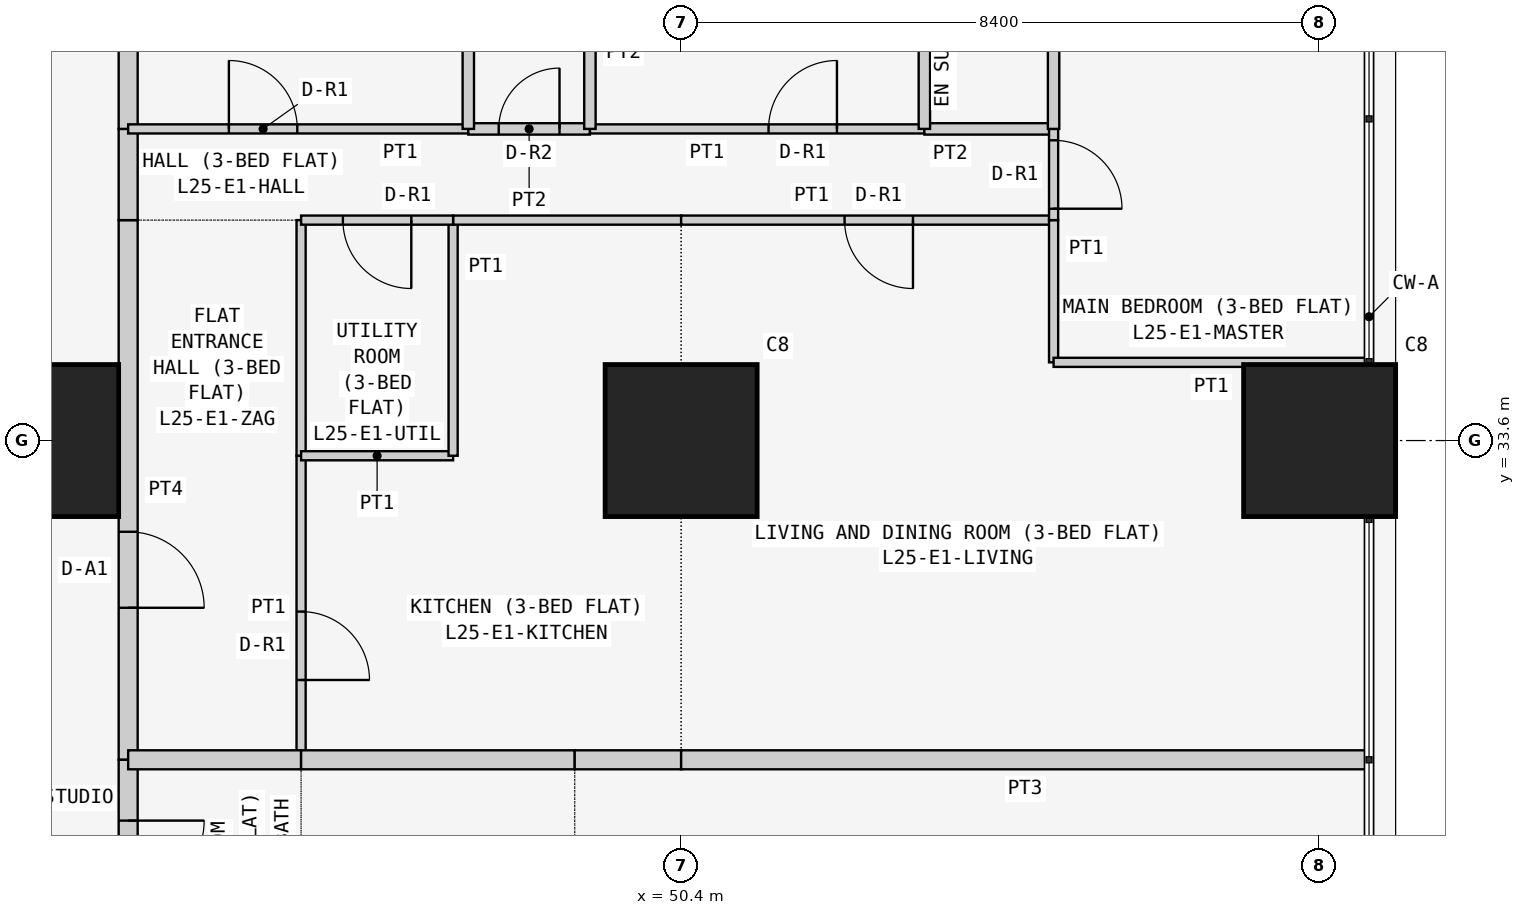
"""IFC4 building model, lengths in metres.
Left out: names, types, materials, properties, quantities, classifications, styles, units other than length and angle.
Written with IfcOpenShell. Run it as: python <this file> out.ifc"""

import sys

from ifc_helpers import new_model, si_unit, direction, frame, frame_2d, origin, origin_2d, place, context, subcontext, project, spatial, rectangle, extrude, element, fill, save


model = new_model("IFC4")
c1 = context("Model", 3, precision=1e-05, world=origin(), true_north=direction((0.0, 1.0)))
c2 = subcontext(c1, "Body", "Model", "MODEL_VIEW")
j1 = project(units=[si_unit("LENGTHUNIT", "METRE"), si_unit("PLANEANGLEUNIT", "RADIAN")], contexts=[c1])
p1 = place(None, origin())
s1 = spatial("IfcSite", under=j1, at=p1, CompositionType="ELEMENT")
p2 = place(p1, origin())
s2 = spatial("IfcBuilding", under=s1, at=p2, CompositionType="ELEMENT")
p3 = place(p2, frame((0.0, 0.0, 99.3)))
s3 = spatial("IfcBuildingStorey", under=s2, at=p3, CompositionType="ELEMENT", Elevation=99.3)
for number, where, z_axis, x_axis in (
    (1, (42.0, 33.6, 0.0), (0.0, 0.0, 1.0), (1.0, 0.0, 0.0)),
    (2, (50.4, 33.6, 0.0), (0.0, 0.0, 1.0), (1.0, 0.0, 0.0)),
    (3, (58.8, 33.6, 0.0), (0.0, 0.0, 1.0), (1.0, 0.0, 0.0)),
):
    element("IfcColumn", number, at=place(p3, frame(where, z_axis=z_axis, x_axis=x_axis)), inside=s3, PredefinedType="COLUMN", context=c2, shape_type="SweptSolid", body=[
        extrude(rectangle(XDim=2.0, YDim=2.0, at=origin_2d()), origin(), (0.0, 0.0, 1.0), 3.6),
    ])
p4 = place(p3, frame((43.125, 36.5, 0.0), z_axis=(0.0, 0.0, 1.0), x_axis=(0.0, -1.0, 0.0)))
e4 = element("IfcWall", 4, at=p4, inside=s3, PredefinedType="PARTITIONING", context=c2, shape_type="SweptSolid", body=[
    extrude(rectangle(XDim=7.1, YDim=0.25, at=frame_2d((3.55, 0.0))), origin(), (0.0, 0.0, 1.0), 3.35),
])
p5 = place(p4, frame((4.1, 0.0, 0.0)))
e5 = element("IfcOpeningElement", 5, at=p5, cuts=e4, PredefinedType="OPENING", context=c2, shape_type="SweptSolid", body=[
    extrude(rectangle(XDim=1.0, YDim=2.1, at=frame_2d((0.5, 1.05))), frame((0.0, 0.135, 0.0), z_axis=(0.0, -1.0, 0.0), x_axis=(1.0, 0.0, 0.0)), (0.0, 0.0, 1.0), 0.27),
])
p6 = place(p3, frame((43.125, 37.7, 0.0), z_axis=(0.0, 0.0, 1.0), x_axis=(0.0, -1.0, 0.0)))
e6 = element("IfcWall", 6, at=p6, inside=s3, PredefinedType="PARTITIONING", context=c2, shape_type="SweptSolid", body=[
    extrude(rectangle(XDim=1.2, YDim=0.25, at=frame_2d((0.6, 0.0))), origin(), (0.0, 0.0, 1.0), 3.35),
])
p7 = place(p3, frame((43.125, 42.7, 0.0), z_axis=(0.0, 0.0, 1.0), x_axis=(0.0, -1.0, 0.0)))
e7 = element("IfcWall", 7, at=p7, inside=s3, PredefinedType="PARTITIONING", context=c2, shape_type="SweptSolid", body=[
    extrude(rectangle(XDim=5.0, YDim=0.25, at=frame_2d((2.5, 0.0))), origin(), (0.0, 0.0, 1.0), 3.35),
])
p8 = place(p3, frame((43.125, 29.4, 0.0), z_axis=(0.0, 0.0, 1.0), x_axis=(0.0, -1.0, 0.0)))
e8 = element("IfcWall", 8, at=p8, inside=s3, PredefinedType="PARTITIONING", context=c2, shape_type="SweptSolid", body=[
    extrude(rectangle(XDim=2.6, YDim=0.25, at=frame_2d((1.3, 0.0))), origin(), (0.0, 0.0, 1.0), 3.35),
])
p9 = place(p8, frame((0.8, 0.0, 0.0)))
e9 = element("IfcOpeningElement", 9, at=p9, cuts=e8, PredefinedType="OPENING", context=c2, shape_type="SweptSolid", body=[
    extrude(rectangle(XDim=1.0, YDim=2.1, at=frame_2d((0.5, 1.05))), frame((0.0, 0.135, 0.0), z_axis=(0.0, -1.0, 0.0), x_axis=(1.0, 0.0, 0.0)), (0.0, 0.0, 1.0), 0.27),
])
p10 = place(p3, frame((45.4, 29.4, 0.0), z_axis=(0.0, 0.0, 1.0), x_axis=(0.0, 1.0, 0.0)))
e10 = element("IfcWall", 10, at=p10, inside=s3, PredefinedType="PARTITIONING", context=c2, shape_type="SweptSolid", body=[
    extrude(rectangle(XDim=4.0, YDim=0.12, at=frame_2d((2.0, 0.0))), origin(), (0.0, 0.0, 1.0), 3.35),
])
p11 = place(p10, frame((1.05, 0.0, 0.0)))
e11 = element("IfcOpeningElement", 11, at=p11, cuts=e10, PredefinedType="OPENING", context=c2, shape_type="SweptSolid", body=[
    extrude(rectangle(XDim=0.9, YDim=2.1, at=frame_2d((0.45, 1.05))), frame((0.0, 0.07, 0.0), z_axis=(0.0, -1.0, 0.0), x_axis=(1.0, 0.0, 0.0)), (0.0, 0.0, 1.0), 0.14),
])
p12 = place(p3, frame((45.4, 33.4, 0.0), z_axis=(0.0, 0.0, 1.0), x_axis=(0.0, 1.0, 0.0)))
e12 = element("IfcWall", 12, at=p12, inside=s3, PredefinedType="PARTITIONING", context=c2, shape_type="SweptSolid", body=[
    extrude(rectangle(XDim=3.1, YDim=0.12, at=frame_2d((1.55, 0.0))), origin(), (0.0, 0.0, 1.0), 3.35),
])
p13 = place(p3, frame((43.125, 29.4, 0.0), z_axis=(0.0, 0.0, 1.0), x_axis=(1.0, 0.0, 0.0)))
e13 = element("IfcWall", 13, at=p13, inside=s3, PredefinedType="PARTITIONING", context=c2, shape_type="SweptSolid", body=[
    extrude(rectangle(XDim=2.275, YDim=0.25, at=frame_2d((1.137, 0.0))), origin(), (0.0, 0.0, 1.0), 3.35),
])
p14 = place(p3, frame((45.4, 33.4, 0.0), z_axis=(0.0, 0.0, 1.0), x_axis=(1.0, 0.0, 0.0)))
e14 = element("IfcWall", 14, at=p14, inside=s3, PredefinedType="PARTITIONING", context=c2, shape_type="SweptSolid", body=[
    extrude(rectangle(XDim=2.0, YDim=0.12, at=frame_2d((1.0, 0.0))), origin(), (0.0, 0.0, 1.0), 3.35),
])
p15 = place(p3, frame((47.4, 33.4, 0.0), z_axis=(0.0, 0.0, 1.0), x_axis=(0.0, 1.0, 0.0)))
e15 = element("IfcWall", 15, at=p15, inside=s3, PredefinedType="PARTITIONING", context=c2, shape_type="SweptSolid", body=[
    extrude(rectangle(XDim=3.1, YDim=0.12, at=frame_2d((1.55, 0.0))), origin(), (0.0, 0.0, 1.0), 3.35),
])
p16 = place(p3, frame((47.4, 36.5, 0.0), z_axis=(0.0, 0.0, 1.0), x_axis=(1.0, 0.0, 0.0)))
e16 = element("IfcWall", 16, at=p16, inside=s3, PredefinedType="PARTITIONING", context=c2, shape_type="SweptSolid", body=[
    extrude(rectangle(XDim=3.0, YDim=0.12, at=frame_2d((1.5, 0.0))), origin(), (0.0, 0.0, 1.0), 3.35),
])
p17 = place(p3, frame((49.0, 29.4, 0.0), z_axis=(0.0, 0.0, 1.0), x_axis=(-1.0, 0.0, 0.0)))
e17 = element("IfcWall", 17, at=p17, inside=s3, PredefinedType="PARTITIONING", context=c2, shape_type="SweptSolid", body=[
    extrude(rectangle(XDim=3.6, YDim=0.25, at=frame_2d((1.8, 0.0))), origin(), (0.0, 0.0, 1.0), 3.35),
])
p18 = place(p3, frame((50.4, 29.4, 0.0), z_axis=(0.0, 0.0, 1.0), x_axis=(-1.0, 0.0, 0.0)))
e18 = element("IfcWall", 18, at=p18, inside=s3, PredefinedType="PARTITIONING", context=c2, shape_type="SweptSolid", body=[
    extrude(rectangle(XDim=1.4, YDim=0.25, at=frame_2d((0.7, 0.0))), origin(), (0.0, 0.0, 1.0), 3.35),
])
p19 = place(p3, frame((47.4, 36.5, 0.0), z_axis=(0.0, 0.0, 1.0), x_axis=(-1.0, 0.0, 0.0)))
e19 = element("IfcWall", 19, at=p19, inside=s3, PredefinedType="PARTITIONING", context=c2, shape_type="SweptSolid", body=[
    extrude(rectangle(XDim=2.0, YDim=0.12, at=frame_2d((1.0, 0.0))), origin(), (0.0, 0.0, 1.0), 3.35),
])
p20 = place(p19, frame((0.55, 0.0, 0.0)))
e20 = element("IfcOpeningElement", 20, at=p20, cuts=e19, PredefinedType="OPENING", context=c2, shape_type="SweptSolid", body=[
    extrude(rectangle(XDim=0.9, YDim=2.1, at=frame_2d((0.45, 1.05))), frame((0.0, 0.07, 0.0), z_axis=(0.0, -1.0, 0.0), x_axis=(1.0, 0.0, 0.0)), (0.0, 0.0, 1.0), 0.14),
])
p21 = place(p3, frame((50.4, 36.5, 0.0), z_axis=(0.0, 0.0, 1.0), x_axis=(1.0, 0.0, 0.0)))
e21 = element("IfcWall", 21, at=p21, inside=s3, PredefinedType="PARTITIONING", context=c2, shape_type="SweptSolid", body=[
    extrude(rectangle(XDim=4.9, YDim=0.12, at=frame_2d((2.45, 0.0))), origin(), (0.0, 0.0, 1.0), 3.35),
])
p22 = place(p21, frame((2.15, 0.0, 0.0)))
e22 = element("IfcOpeningElement", 22, at=p22, cuts=e21, PredefinedType="OPENING", context=c2, shape_type="SweptSolid", body=[
    extrude(rectangle(XDim=0.9, YDim=2.1, at=frame_2d((0.45, 1.05))), frame((0.0, 0.07, 0.0), z_axis=(0.0, -1.0, 0.0), x_axis=(1.0, 0.0, 0.0)), (0.0, 0.0, 1.0), 0.14),
])
p23 = place(p3, frame((55.3, 36.5, 0.0), z_axis=(0.0, 0.0, 1.0), x_axis=(0.0, -1.0, 0.0)))
e23 = element("IfcWall", 23, at=p23, inside=s3, PredefinedType="PARTITIONING", context=c2, shape_type="SweptSolid", body=[
    extrude(rectangle(XDim=1.871, YDim=0.12, at=frame_2d((0.936, 0.0))), origin(), (0.0, 0.0, 1.0), 3.35),
])
p24 = place(p3, frame((55.3, 34.629, 0.0), z_axis=(0.0, 0.0, 1.0), x_axis=(1.0, 0.0, 0.0)))
e24 = element("IfcWall", 24, at=p24, inside=s3, PredefinedType="PARTITIONING", context=c2, shape_type="SweptSolid", body=[
    extrude(rectangle(XDim=4.15, YDim=0.12, at=frame_2d((2.075, 0.0))), origin(), (0.0, 0.0, 1.0), 3.35),
])
p25 = place(p3, frame((59.45, 29.4, 0.0), z_axis=(0.0, 0.0, 1.0), x_axis=(-1.0, 0.0, 0.0)))
e25 = element("IfcWall", 25, at=p25, inside=s3, PredefinedType="PARTITIONING", context=c2, shape_type="SweptSolid", body=[
    extrude(rectangle(XDim=9.05, YDim=0.25, at=frame_2d((4.525, 0.0))), origin(), (0.0, 0.0, 1.0), 3.35),
])
p26 = place(p3, frame((47.6, 37.7, 0.0), z_axis=(0.0, 0.0, 1.0), x_axis=(-1.0, 0.0, 0.0)))
e26 = element("IfcWall", 26, at=p26, inside=s3, PredefinedType="PARTITIONING", context=c2, shape_type="SweptSolid", body=[
    extrude(rectangle(XDim=4.475, YDim=0.12, at=frame_2d((2.238, 0.0))), origin(), (0.0, 0.0, 1.0), 3.35),
])
p27 = place(p26, frame((2.25, 0.0, 0.0)))
e27 = element("IfcOpeningElement", 27, at=p27, cuts=e26, PredefinedType="OPENING", context=c2, shape_type="SweptSolid", body=[
    extrude(rectangle(XDim=0.9, YDim=2.1, at=frame_2d((0.45, 1.05))), frame((0.0, 0.07, 0.0), z_axis=(0.0, -1.0, 0.0), x_axis=(1.0, 0.0, 0.0)), (0.0, 0.0, 1.0), 0.14),
])
p28 = place(p3, frame((49.2, 37.7, 0.0), z_axis=(0.0, 0.0, 1.0), x_axis=(-1.0, 0.0, 0.0)))
e28 = element("IfcWall", 28, at=p28, inside=s3, PredefinedType="PARTITIONING", context=c2, shape_type="SweptSolid", body=[
    extrude(rectangle(XDim=1.6, YDim=0.15, at=frame_2d((0.8, 0.0))), origin(), (0.0, 0.0, 1.0), 3.35),
])
p29 = place(p28, frame((0.4, 0.0, 0.0)))
e29 = element("IfcOpeningElement", 29, at=p29, cuts=e28, PredefinedType="OPENING", context=c2, shape_type="SweptSolid", body=[
    extrude(rectangle(XDim=0.8, YDim=2.1, at=frame_2d((0.4, 1.05))), frame((0.0, 0.085, 0.0), z_axis=(0.0, -1.0, 0.0), x_axis=(1.0, 0.0, 0.0)), (0.0, 0.0, 1.0), 0.17),
])
p30 = place(p3, frame((53.6, 37.7, 0.0), z_axis=(0.0, 0.0, 1.0), x_axis=(-1.0, 0.0, 0.0)))
e30 = element("IfcWall", 30, at=p30, inside=s3, PredefinedType="PARTITIONING", context=c2, shape_type="SweptSolid", body=[
    extrude(rectangle(XDim=4.4, YDim=0.12, at=frame_2d((2.2, 0.0))), origin(), (0.0, 0.0, 1.0), 3.35),
])
p31 = place(p30, frame((1.15, 0.0, 0.0)))
e31 = element("IfcOpeningElement", 31, at=p31, cuts=e30, PredefinedType="OPENING", context=c2, shape_type="SweptSolid", body=[
    extrude(rectangle(XDim=0.9, YDim=2.1, at=frame_2d((0.45, 1.05))), frame((0.0, 0.07, 0.0), z_axis=(0.0, -1.0, 0.0), x_axis=(1.0, 0.0, 0.0)), (0.0, 0.0, 1.0), 0.14),
])
p32 = place(p3, frame((55.3, 37.7, 0.0), z_axis=(0.0, 0.0, 1.0), x_axis=(-1.0, 0.0, 0.0)))
e32 = element("IfcWall", 32, at=p32, inside=s3, PredefinedType="PARTITIONING", context=c2, shape_type="SweptSolid", body=[
    extrude(rectangle(XDim=1.7, YDim=0.15, at=frame_2d((0.85, 0.0))), origin(), (0.0, 0.0, 1.0), 3.35),
])
p33 = place(p3, frame((55.3, 36.5, 0.0), z_axis=(0.0, 0.0, 1.0), x_axis=(0.0, 1.0, 0.0)))
e33 = element("IfcWall", 33, at=p33, inside=s3, PredefinedType="PARTITIONING", context=c2, shape_type="SweptSolid", body=[
    extrude(rectangle(XDim=1.2, YDim=0.12, at=frame_2d((0.6, 0.0))), origin(), (0.0, 0.0, 1.0), 3.35),
])
p34 = place(p33, frame((0.15, 0.0, 0.0)))
e34 = element("IfcOpeningElement", 34, at=p34, cuts=e33, PredefinedType="OPENING", context=c2, shape_type="SweptSolid", body=[
    extrude(rectangle(XDim=0.9, YDim=2.1, at=frame_2d((0.45, 1.05))), frame((0.0, 0.07, 0.0), z_axis=(0.0, -1.0, 0.0), x_axis=(1.0, 0.0, 0.0)), (0.0, 0.0, 1.0), 0.14),
])
for number, where, z_axis, x_axis in (
    (35, (47.6, 37.7, 0.0), (0.0, 0.0, 1.0), (0.0, 1.0, 0.0)),
    (36, (49.2, 37.7, 0.0), (0.0, 0.0, 1.0), (0.0, 1.0, 0.0)),
    (37, (53.6, 37.7, 0.0), (0.0, 0.0, 1.0), (0.0, 1.0, 0.0)),
):
    element("IfcWall", number, at=place(p3, frame(where, z_axis=z_axis, x_axis=x_axis)), inside=s3, PredefinedType="PARTITIONING", context=c2, shape_type="SweptSolid", body=[
        extrude(rectangle(XDim=5.0, YDim=0.15, at=frame_2d((2.5, 0.0))), origin(), (0.0, 0.0, 1.0), 3.35),
    ])
p35 = place(p3, frame((55.3, 37.7, 0.0), z_axis=(0.0, 0.0, 1.0), x_axis=(0.0, 1.0, 0.0)))
e38 = element("IfcWall", 38, at=p35, inside=s3, PredefinedType="PARTITIONING", context=c2, shape_type="SweptSolid", body=[
    extrude(rectangle(XDim=5.0, YDim=0.15, at=frame_2d((2.5, 0.0))), origin(), (0.0, 0.0, 1.0), 3.35),
])
p36 = place(p35, frame((2.3, 0.0, 0.0)))
e39 = element("IfcOpeningElement", 39, at=p36, cuts=e38, PredefinedType="OPENING", context=c2, shape_type="SweptSolid", body=[
    extrude(rectangle(XDim=0.8, YDim=2.1, at=frame_2d((0.4, 1.05))), frame((0.0, 0.085, 0.0), z_axis=(0.0, -1.0, 0.0), x_axis=(1.0, 0.0, 0.0)), (0.0, 0.0, 1.0), 0.17),
])
p37 = place(p5, origin())
e40 = element("IfcDoor", 40, at=p37, inside=s3, OperationType="SINGLE_SWING_RIGHT", PredefinedType="DOOR", context=c2, shape_type="SweptSolid", body=[
    extrude(rectangle(XDim=1.0, YDim=2.1, at=frame_2d((0.5, 1.05))), frame((0.0, 0.025, 0.0), z_axis=(0.0, -1.0, 0.0), x_axis=(1.0, 0.0, 0.0)), (0.0, 0.0, 1.0), 0.05),
])
fill(e5, e40)
p38 = place(p11, frame((0.9, 0.0, 0.0), z_axis=(0.0, 0.0, 1.0), x_axis=(-1.0, 0.0, 0.0)))
e41 = element("IfcDoor", 41, at=p38, inside=s3, OperationType="SINGLE_SWING_RIGHT", PredefinedType="DOOR", context=c2, shape_type="SweptSolid", body=[
    extrude(rectangle(XDim=0.9, YDim=2.1, at=frame_2d((0.45, 1.05))), frame((0.0, 0.025, 0.0), z_axis=(0.0, -1.0, 0.0), x_axis=(1.0, 0.0, 0.0)), (0.0, 0.0, 1.0), 0.05),
])
fill(e11, e41)
p39 = place(p20, origin())
e42 = element("IfcDoor", 42, at=p39, inside=s3, OperationType="SINGLE_SWING_LEFT", PredefinedType="DOOR", context=c2, shape_type="SweptSolid", body=[
    extrude(rectangle(XDim=0.9, YDim=2.1, at=frame_2d((0.45, 1.05))), frame((0.0, 0.025, 0.0), z_axis=(0.0, -1.0, 0.0), x_axis=(1.0, 0.0, 0.0)), (0.0, 0.0, 1.0), 0.05),
])
fill(e20, e42)
p40 = place(p22, frame((0.9, 0.0, 0.0), z_axis=(0.0, 0.0, 1.0), x_axis=(-1.0, 0.0, 0.0)))
e43 = element("IfcDoor", 43, at=p40, inside=s3, OperationType="SINGLE_SWING_LEFT", PredefinedType="DOOR", context=c2, shape_type="SweptSolid", body=[
    extrude(rectangle(XDim=0.9, YDim=2.1, at=frame_2d((0.45, 1.05))), frame((0.0, 0.025, 0.0), z_axis=(0.0, -1.0, 0.0), x_axis=(1.0, 0.0, 0.0)), (0.0, 0.0, 1.0), 0.05),
])
fill(e22, e43)
p41 = place(p27, frame((0.9, 0.0, 0.0), z_axis=(0.0, 0.0, 1.0), x_axis=(-1.0, 0.0, 0.0)))
e44 = element("IfcDoor", 44, at=p41, inside=s3, OperationType="SINGLE_SWING_LEFT", PredefinedType="DOOR", context=c2, shape_type="SweptSolid", body=[
    extrude(rectangle(XDim=0.9, YDim=2.1, at=frame_2d((0.45, 1.05))), frame((0.0, 0.025, 0.0), z_axis=(0.0, -1.0, 0.0), x_axis=(1.0, 0.0, 0.0)), (0.0, 0.0, 1.0), 0.05),
])
fill(e27, e44)
p42 = place(p29, frame((0.8, 0.0, 0.0), z_axis=(0.0, 0.0, 1.0), x_axis=(-1.0, 0.0, 0.0)))
e45 = element("IfcDoor", 45, at=p42, inside=s3, OperationType="SINGLE_SWING_RIGHT", PredefinedType="DOOR", context=c2, shape_type="SweptSolid", body=[
    extrude(rectangle(XDim=0.8, YDim=2.1, at=frame_2d((0.4, 1.05))), frame((0.0, 0.025, 0.0), z_axis=(0.0, -1.0, 0.0), x_axis=(1.0, 0.0, 0.0)), (0.0, 0.0, 1.0), 0.05),
])
fill(e29, e45)
p43 = place(p31, frame((0.9, 0.0, 0.0), z_axis=(0.0, 0.0, 1.0), x_axis=(-1.0, 0.0, 0.0)))
e46 = element("IfcDoor", 46, at=p43, inside=s3, OperationType="SINGLE_SWING_RIGHT", PredefinedType="DOOR", context=c2, shape_type="SweptSolid", body=[
    extrude(rectangle(XDim=0.9, YDim=2.1, at=frame_2d((0.45, 1.05))), frame((0.0, 0.025, 0.0), z_axis=(0.0, -1.0, 0.0), x_axis=(1.0, 0.0, 0.0)), (0.0, 0.0, 1.0), 0.05),
])
fill(e31, e46)
p44 = place(p34, frame((0.9, 0.0, 0.0), z_axis=(0.0, 0.0, 1.0), x_axis=(-1.0, 0.0, 0.0)))
e47 = element("IfcDoor", 47, at=p44, inside=s3, OperationType="SINGLE_SWING_RIGHT", PredefinedType="DOOR", context=c2, shape_type="SweptSolid", body=[
    extrude(rectangle(XDim=0.9, YDim=2.1, at=frame_2d((0.45, 1.05))), frame((0.0, 0.025, 0.0), z_axis=(0.0, -1.0, 0.0), x_axis=(1.0, 0.0, 0.0)), (0.0, 0.0, 1.0), 0.05),
])
fill(e34, e47)
p45 = place(p9, origin())
e48 = element("IfcDoor", 48, at=p45, inside=s3, OperationType="SINGLE_SWING_LEFT", PredefinedType="DOOR", context=c2, shape_type="SweptSolid", body=[
    extrude(rectangle(XDim=1.0, YDim=2.1, at=frame_2d((0.5, 1.05))), frame((0.0, 0.025, 0.0), z_axis=(0.0, -1.0, 0.0), x_axis=(1.0, 0.0, 0.0)), (0.0, 0.0, 1.0), 0.05),
])
fill(e9, e48)
save(model, sys.argv[1])
